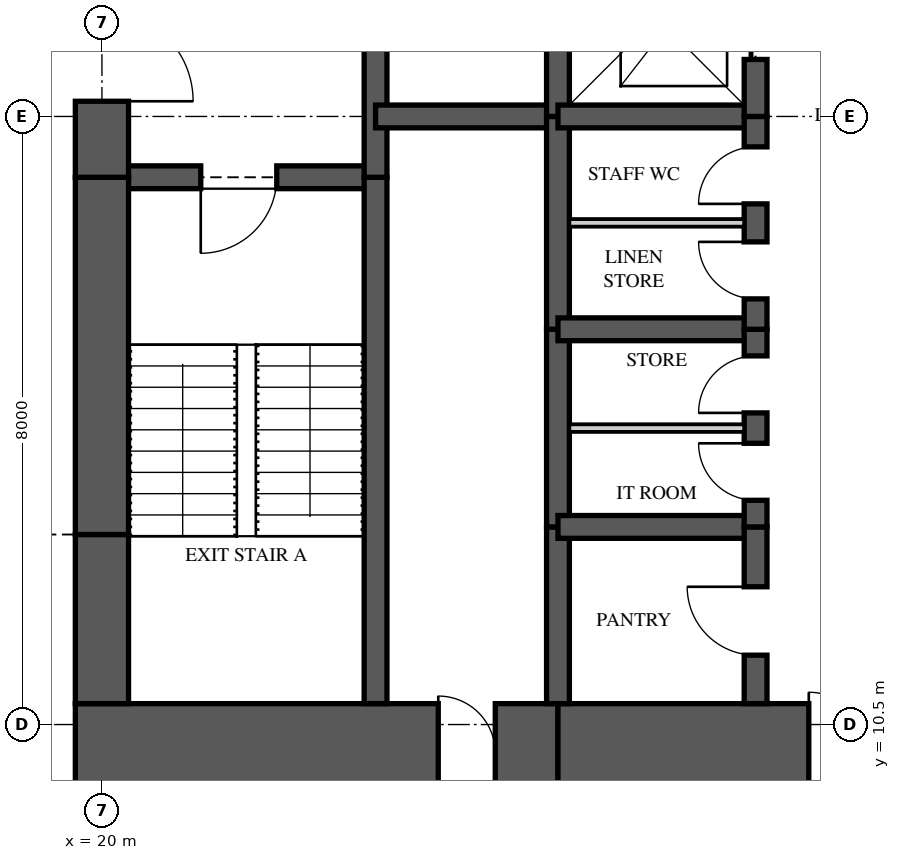
"""IFC4 building model, lengths in metres.
Left out: names, types, materials, properties, quantities, classifications, styles, units other than length and angle.
Written with IfcOpenShell. Run it as: python <this file> out.ifc"""

import sys

from ifc_helpers import new_model, si_unit, direction, frame, frame_2d, origin, place, context, subcontext, project, spatial, rectangle, extrude, element, fill, save


model = new_model("IFC4")
c1 = context("Model", 3, precision=1e-05, world=origin(), true_north=direction((0.0, 1.0)))
c2 = subcontext(c1, "Body", "Model", "MODEL_VIEW")
j1 = project(units=[si_unit("LENGTHUNIT", "METRE"), si_unit("PLANEANGLEUNIT", "RADIAN")], contexts=[c1])
p1 = place(None, origin())
s1 = spatial("IfcSite", under=j1, at=p1, CompositionType="ELEMENT")
p2 = place(p1, origin())
s2 = spatial("IfcBuilding", under=s1, at=p2, CompositionType="ELEMENT")
p3 = place(p2, frame((0.0, 0.0, 154.35)))
s3 = spatial("IfcBuildingStorey", under=s2, at=p3, CompositionType="ELEMENT", Elevation=154.35)
p4 = place(p3, frame((19.65, 10.125, 0.0), z_axis=(0.0, 0.0, 1.0), x_axis=(1.0, 0.0, 0.0)))
e1 = element("IfcWall", 1, at=p4, inside=s3, PredefinedType="SHEAR", context=c2, shape_type="SweptSolid", body=[
    extrude(rectangle(XDim=6.35, YDim=1.3, at=frame_2d((3.175, 0.0))), origin(), (0.0, 0.0, 1.0), 3.35),
])
p5 = place(p4, frame((4.775, 0.0, 0.0)))
e2 = element("IfcOpeningElement", 2, at=p5, cuts=e1, PredefinedType="OPENING", context=c2, shape_type="SweptSolid", body=[
    extrude(rectangle(XDim=0.75, YDim=2.1, at=frame_2d((0.375, 1.05))), frame((0.0, 0.66, 0.0), z_axis=(0.0, -1.0, 0.0), x_axis=(1.0, 0.0, 0.0)), (0.0, 0.0, 1.0), 1.32),
])
p6 = place(p3, frame((26.0, 10.125, 0.0), z_axis=(0.0, 0.0, 1.0), x_axis=(1.0, 0.0, 0.0)))
e3 = element("IfcWall", 3, at=p6, inside=s3, PredefinedType="SHEAR", context=c2, shape_type="SweptSolid", body=[
    extrude(rectangle(XDim=5.6, YDim=1.3, at=frame_2d((2.8, 0.0))), origin(), (0.0, 0.0, 1.0), 3.35),
])
p7 = place(p6, frame((3.3, 0.0, 0.0)))
e4 = element("IfcOpeningElement", 4, at=p7, cuts=e3, PredefinedType="OPENING", context=c2, shape_type="SweptSolid", body=[
    extrude(rectangle(XDim=1.6, YDim=2.1, at=frame_2d((0.8, 1.05))), frame((0.0, 0.66, 0.0), z_axis=(0.0, -1.0, 0.0), x_axis=(1.0, 0.0, 0.0)), (0.0, 0.0, 1.0), 1.32),
])
p8 = place(p3, frame((20.0, 23.3, 0.0), z_axis=(0.0, 0.0, 1.0), x_axis=(0.0, -1.0, 0.0)))
e5 = element("IfcWall", 5, at=p8, inside=s3, PredefinedType="SHEAR", context=c2, shape_type="SweptSolid", body=[
    extrude(rectangle(XDim=5.6, YDim=0.7, at=frame_2d((2.8, 0.0))), origin(), (0.0, 0.0, 1.0), 3.35),
])
p9 = place(p8, frame((3.4, 0.0, 0.0)))
e6 = element("IfcOpeningElement", 6, at=p9, cuts=e5, PredefinedType="OPENING", context=c2, shape_type="SweptSolid", body=[
    extrude(rectangle(XDim=1.2, YDim=2.2, at=frame_2d((0.6, 1.1))), frame((0.0, 0.36, 0.0), z_axis=(0.0, -1.0, 0.0), x_axis=(1.0, 0.0, 0.0)), (0.0, 0.0, 1.0), 0.72),
])
p10 = place(p3, frame((20.0, 17.7, 0.0), z_axis=(0.0, 0.0, 1.0), x_axis=(0.0, -1.0, 0.0)))
e7 = element("IfcWall", 7, at=p10, inside=s3, PredefinedType="SHEAR", context=c2, shape_type="SweptSolid", body=[
    extrude(rectangle(XDim=4.7, YDim=0.7, at=frame_2d((2.35, 0.0))), origin(), (0.0, 0.0, 1.0), 3.35),
])
p11 = place(p3, frame((20.0, 13.0, 0.0), z_axis=(0.0, 0.0, 1.0), x_axis=(0.0, -1.0, 0.0)))
e8 = element("IfcWall", 8, at=p11, inside=s3, PredefinedType="SHEAR", context=c2, shape_type="SweptSolid", body=[
    extrude(rectangle(XDim=2.225, YDim=0.7, at=frame_2d((1.113, 0.0))), origin(), (0.0, 0.0, 1.0), 3.35),
])
p12 = place(p3, frame((23.6, 10.775, 0.0), z_axis=(0.0, 0.0, 1.0), x_axis=(0.0, 1.0, 0.0)))
e9 = element("IfcWall", 9, at=p12, inside=s3, PredefinedType="SHEAR", context=c2, shape_type="SweptSolid", body=[
    extrude(rectangle(XDim=6.925, YDim=0.3, at=frame_2d((3.462, 0.0))), origin(), (0.0, 0.0, 1.0), 3.35),
])
p13 = place(p3, frame((23.6, 17.7, 0.0), z_axis=(0.0, 0.0, 1.0), x_axis=(0.0, 1.0, 0.0)))
e10 = element("IfcWall", 10, at=p13, inside=s3, PredefinedType="SHEAR", context=c2, shape_type="SweptSolid", body=[
    extrude(rectangle(XDim=5.6, YDim=0.3, at=frame_2d((2.8, 0.0))), origin(), (0.0, 0.0, 1.0), 3.35),
])
p14 = place(p3, frame((26.0, 10.775, 0.0), z_axis=(0.0, 0.0, 1.0), x_axis=(0.0, 1.0, 0.0)))
e11 = element("IfcWall", 11, at=p14, inside=s3, PredefinedType="SHEAR", context=c2, shape_type="SweptSolid", body=[
    extrude(rectangle(XDim=2.325, YDim=0.3, at=frame_2d((1.163, 0.0))), origin(), (0.0, 0.0, 1.0), 3.35),
])
p15 = place(p3, frame((26.0, 13.1, 0.0), z_axis=(0.0, 0.0, 1.0), x_axis=(0.0, 1.0, 0.0)))
e12 = element("IfcWall", 12, at=p15, inside=s3, PredefinedType="SHEAR", context=c2, shape_type="SweptSolid", body=[
    extrude(rectangle(XDim=2.6, YDim=0.3, at=frame_2d((1.3, 0.0))), origin(), (0.0, 0.0, 1.0), 3.35),
])
p16 = place(p3, frame((26.0, 15.7, 0.0), z_axis=(0.0, 0.0, 1.0), x_axis=(0.0, 1.0, 0.0)))
e13 = element("IfcWall", 13, at=p16, inside=s3, PredefinedType="SHEAR", context=c2, shape_type="SweptSolid", body=[
    extrude(rectangle(XDim=2.8, YDim=0.3, at=frame_2d((1.4, 0.0))), origin(), (0.0, 0.0, 1.0), 3.35),
])
p17 = place(p3, frame((26.0, 18.5, 0.0), z_axis=(0.0, 0.0, 1.0), x_axis=(0.0, 1.0, 0.0)))
e14 = element("IfcWall", 14, at=p17, inside=s3, PredefinedType="SHEAR", context=c2, shape_type="SweptSolid", body=[
    extrude(rectangle(XDim=2.6, YDim=0.3, at=frame_2d((1.3, 0.0))), origin(), (0.0, 0.0, 1.0), 3.35),
])
p18 = place(p3, frame((28.6, 10.775, 0.0), z_axis=(0.0, 0.0, 1.0), x_axis=(0.0, 1.0, 0.0)))
e15 = element("IfcWall", 15, at=p18, inside=s3, PredefinedType="SHEAR", context=c2, shape_type="SweptSolid", body=[
    extrude(rectangle(XDim=2.325, YDim=0.3, at=frame_2d((1.163, 0.0))), origin(), (0.0, 0.0, 1.0), 3.35),
])
p19 = place(p18, frame((0.637, 0.0, 0.0)))
e16 = element("IfcOpeningElement", 16, at=p19, cuts=e15, PredefinedType="OPENING", context=c2, shape_type="SweptSolid", body=[
    extrude(rectangle(XDim=0.9, YDim=2.1, at=frame_2d((0.45, 1.05))), frame((0.0, 0.16, 0.0), z_axis=(0.0, -1.0, 0.0), x_axis=(1.0, 0.0, 0.0)), (0.0, 0.0, 1.0), 0.32),
])
p20 = place(p3, frame((28.6, 13.1, 0.0), z_axis=(0.0, 0.0, 1.0), x_axis=(0.0, 1.0, 0.0)))
e17 = element("IfcWall", 17, at=p20, inside=s3, PredefinedType="SHEAR", context=c2, shape_type="SweptSolid", body=[
    extrude(rectangle(XDim=2.6, YDim=0.3, at=frame_2d((1.3, 0.0))), origin(), (0.0, 0.0, 1.0), 3.35),
])
p21 = place(p20, frame((0.35, 0.0, 0.0)))
e18 = element("IfcOpeningElement", 18, at=p21, cuts=e17, PredefinedType="OPENING", context=c2, shape_type="SweptSolid", body=[
    extrude(rectangle(XDim=0.75, YDim=2.1, at=frame_2d((0.375, 1.05))), frame((0.0, 0.16, 0.0), z_axis=(0.0, -1.0, 0.0), x_axis=(1.0, 0.0, 0.0)), (0.0, 0.0, 1.0), 0.32),
])
p22 = place(p20, frame((1.5, 0.0, 0.0)))
e19 = element("IfcOpeningElement", 19, at=p22, cuts=e17, PredefinedType="OPENING", context=c2, shape_type="SweptSolid", body=[
    extrude(rectangle(XDim=0.75, YDim=2.1, at=frame_2d((0.375, 1.05))), frame((0.0, 0.16, 0.0), z_axis=(0.0, -1.0, 0.0), x_axis=(1.0, 0.0, 0.0)), (0.0, 0.0, 1.0), 0.32),
])
p23 = place(p3, frame((28.6, 15.7, 0.0), z_axis=(0.0, 0.0, 1.0), x_axis=(0.0, 1.0, 0.0)))
e20 = element("IfcWall", 20, at=p23, inside=s3, PredefinedType="SHEAR", context=c2, shape_type="SweptSolid", body=[
    extrude(rectangle(XDim=2.8, YDim=0.3, at=frame_2d((1.4, 0.0))), origin(), (0.0, 0.0, 1.0), 3.35),
])
p24 = place(p23, frame((0.4, 0.0, 0.0)))
e21 = element("IfcOpeningElement", 21, at=p24, cuts=e20, PredefinedType="OPENING", context=c2, shape_type="SweptSolid", body=[
    extrude(rectangle(XDim=0.75, YDim=2.1, at=frame_2d((0.375, 1.05))), frame((0.0, 0.16, 0.0), z_axis=(0.0, -1.0, 0.0), x_axis=(1.0, 0.0, 0.0)), (0.0, 0.0, 1.0), 0.32),
])
p25 = place(p23, frame((1.65, 0.0, 0.0)))
e22 = element("IfcOpeningElement", 22, at=p25, cuts=e20, PredefinedType="OPENING", context=c2, shape_type="SweptSolid", body=[
    extrude(rectangle(XDim=0.75, YDim=2.1, at=frame_2d((0.375, 1.05))), frame((0.0, 0.16, 0.0), z_axis=(0.0, -1.0, 0.0), x_axis=(1.0, 0.0, 0.0)), (0.0, 0.0, 1.0), 0.32),
])
p26 = place(p3, frame((28.6, 18.5, 0.0), z_axis=(0.0, 0.0, 1.0), x_axis=(0.0, 1.0, 0.0)))
e23 = element("IfcWall", 23, at=p26, inside=s3, PredefinedType="SHEAR", context=c2, shape_type="SweptSolid", body=[
    extrude(rectangle(XDim=2.6, YDim=0.3, at=frame_2d((1.3, 0.0))), origin(), (0.0, 0.0, 1.0), 3.35),
])
p27 = place(p26, frame((0.75, 0.0, 0.0)))
e24 = element("IfcOpeningElement", 24, at=p27, cuts=e23, PredefinedType="OPENING", context=c2, shape_type="SweptSolid", body=[
    extrude(rectangle(XDim=1.1, YDim=2.1, at=frame_2d((0.55, 1.05))), frame((0.0, 0.16, 0.0), z_axis=(0.0, -1.0, 0.0), x_axis=(1.0, 0.0, 0.0)), (0.0, 0.0, 1.0), 0.32),
])
p28 = place(p3, frame((20.0, 17.7, 0.0), z_axis=(0.0, 0.0, 1.0), x_axis=(1.0, 0.0, 0.0)))
e25 = element("IfcWall", 25, at=p28, inside=s3, PredefinedType="SHEAR", context=c2, shape_type="SweptSolid", body=[
    extrude(rectangle(XDim=3.6, YDim=0.3, at=frame_2d((1.8, 0.0))), origin(), (0.0, 0.0, 1.0), 3.35),
])
p29 = place(p28, frame((1.3, 0.0, 0.0)))
e26 = element("IfcOpeningElement", 26, at=p29, cuts=e25, PredefinedType="OPENING", context=c2, shape_type="SweptSolid", body=[
    extrude(rectangle(XDim=1.0, YDim=2.1, at=frame_2d((0.5, 1.05))), frame((0.0, 0.16, 0.0), z_axis=(0.0, -1.0, 0.0), x_axis=(1.0, 0.0, 0.0)), (0.0, 0.0, 1.0), 0.32),
])
p30 = place(p3, frame((23.6, 18.5, 0.0), z_axis=(0.0, 0.0, 1.0), x_axis=(1.0, 0.0, 0.0)))
e27 = element("IfcWall", 27, at=p30, inside=s3, PredefinedType="SHEAR", context=c2, shape_type="SweptSolid", body=[
    extrude(rectangle(XDim=2.4, YDim=0.3, at=frame_2d((1.2, 0.0))), origin(), (0.0, 0.0, 1.0), 3.35),
])
for number, where, z_axis, x_axis in (
    (28, (26.0, 13.1, 0.0), (0.0, 0.0, 1.0), (1.0, 0.0, 0.0)),
    (29, (26.0, 15.7, 0.0), (0.0, 0.0, 1.0), (1.0, 0.0, 0.0)),
    (30, (26.0, 18.5, 0.0), (0.0, 0.0, 1.0), (1.0, 0.0, 0.0)),
):
    element("IfcWall", number, at=place(p3, frame(where, z_axis=z_axis, x_axis=x_axis)), inside=s3, PredefinedType="SHEAR", context=c2, shape_type="SweptSolid", body=[
        extrude(rectangle(XDim=2.6, YDim=0.3, at=frame_2d((1.3, 0.0))), origin(), (0.0, 0.0, 1.0), 3.35),
    ])
for number, where, z_axis, x_axis in (
    (31, (26.15, 14.4, 0.0), (0.0, 0.0, 1.0), (1.0, 0.0, 0.0)),
    (32, (26.15, 17.1, 0.0), (0.0, 0.0, 1.0), (1.0, 0.0, 0.0)),
):
    element("IfcWall", number, at=place(p3, frame(where, z_axis=z_axis, x_axis=x_axis)), inside=s3, PredefinedType="PARTITIONING", context=c2, shape_type="SweptSolid", body=[
        extrude(rectangle(XDim=2.3, YDim=0.1, at=frame_2d((1.15, 0.0))), origin(), (0.0, 0.0, 1.0), 3.11),
    ])
p31 = place(p29, frame((1.0, 0.0, 0.0), z_axis=(0.0, 0.0, 1.0), x_axis=(-1.0, 0.0, 0.0)))
e33 = element("IfcDoor", 33, at=p31, inside=s3, OperationType="SINGLE_SWING_RIGHT", PredefinedType="DOOR", context=c2, shape_type="SweptSolid", body=[
    extrude(rectangle(XDim=1.0, YDim=2.1, at=frame_2d((0.5, 1.05))), frame((0.0, 0.025, 0.0), z_axis=(0.0, -1.0, 0.0), x_axis=(1.0, 0.0, 0.0)), (0.0, 0.0, 1.0), 0.05),
])
fill(e26, e33)
p32 = place(p9, origin())
e34 = element("IfcDoor", 34, at=p32, inside=s3, OperationType="SINGLE_SWING_RIGHT", PredefinedType="DOOR", context=c2, shape_type="SweptSolid", body=[
    extrude(rectangle(XDim=1.2, YDim=2.2, at=frame_2d((0.6, 1.1))), frame((0.0, 0.025, 0.0), z_axis=(0.0, -1.0, 0.0), x_axis=(1.0, 0.0, 0.0)), (0.0, 0.0, 1.0), 0.05),
])
fill(e6, e34)
p33 = place(p27, origin())
e35 = element("IfcDoor", 35, at=p33, inside=s3, OperationType="SLIDING_TO_LEFT", PredefinedType="DOOR", context=c2, shape_type="SweptSolid", body=[
    extrude(rectangle(XDim=1.1, YDim=2.1, at=frame_2d((0.55, 1.05))), frame((0.0, 0.025, 0.0), z_axis=(0.0, -1.0, 0.0), x_axis=(1.0, 0.0, 0.0)), (0.0, 0.0, 1.0), 0.05),
])
fill(e24, e35)
p34 = place(p19, origin())
e36 = element("IfcDoor", 36, at=p34, inside=s3, OperationType="SINGLE_SWING_RIGHT", PredefinedType="DOOR", context=c2, shape_type="SweptSolid", body=[
    extrude(rectangle(XDim=0.9, YDim=2.1, at=frame_2d((0.45, 1.05))), frame((0.0, 0.025, 0.0), z_axis=(0.0, -1.0, 0.0), x_axis=(1.0, 0.0, 0.0)), (0.0, 0.0, 1.0), 0.05),
])
fill(e16, e36)
p35 = place(p21, origin())
e37 = element("IfcDoor", 37, at=p35, inside=s3, OperationType="SINGLE_SWING_RIGHT", PredefinedType="DOOR", context=c2, shape_type="SweptSolid", body=[
    extrude(rectangle(XDim=0.75, YDim=2.1, at=frame_2d((0.375, 1.05))), frame((0.0, 0.025, 0.0), z_axis=(0.0, -1.0, 0.0), x_axis=(1.0, 0.0, 0.0)), (0.0, 0.0, 1.0), 0.05),
])
fill(e18, e37)
p36 = place(p22, origin())
e38 = element("IfcDoor", 38, at=p36, inside=s3, OperationType="SINGLE_SWING_LEFT", PredefinedType="DOOR", context=c2, shape_type="SweptSolid", body=[
    extrude(rectangle(XDim=0.75, YDim=2.1, at=frame_2d((0.375, 1.05))), frame((0.0, 0.025, 0.0), z_axis=(0.0, -1.0, 0.0), x_axis=(1.0, 0.0, 0.0)), (0.0, 0.0, 1.0), 0.05),
])
fill(e19, e38)
p37 = place(p24, origin())
e39 = element("IfcDoor", 39, at=p37, inside=s3, OperationType="SINGLE_SWING_RIGHT", PredefinedType="DOOR", context=c2, shape_type="SweptSolid", body=[
    extrude(rectangle(XDim=0.75, YDim=2.1, at=frame_2d((0.375, 1.05))), frame((0.0, 0.025, 0.0), z_axis=(0.0, -1.0, 0.0), x_axis=(1.0, 0.0, 0.0)), (0.0, 0.0, 1.0), 0.05),
])
fill(e21, e39)
p38 = place(p25, origin())
e40 = element("IfcDoor", 40, at=p38, inside=s3, OperationType="SINGLE_SWING_LEFT", PredefinedType="DOOR", context=c2, shape_type="SweptSolid", body=[
    extrude(rectangle(XDim=0.75, YDim=2.1, at=frame_2d((0.375, 1.05))), frame((0.0, 0.025, 0.0), z_axis=(0.0, -1.0, 0.0), x_axis=(1.0, 0.0, 0.0)), (0.0, 0.0, 1.0), 0.05),
])
fill(e22, e40)
p39 = place(p7, origin())
e41 = element("IfcDoor", 41, at=p39, inside=s3, OperationType="DOUBLE_DOOR_SINGLE_SWING", PredefinedType="DOOR", context=c2, shape_type="SweptSolid", body=[
    extrude(rectangle(XDim=1.6, YDim=2.1, at=frame_2d((0.8, 1.05))), frame((0.0, 0.025, 0.0), z_axis=(0.0, -1.0, 0.0), x_axis=(1.0, 0.0, 0.0)), (0.0, 0.0, 1.0), 0.05),
])
fill(e4, e41)
p40 = place(p5, origin())
e42 = element("IfcDoor", 42, at=p40, inside=s3, OperationType="SINGLE_SWING_LEFT", PredefinedType="DOOR", context=c2, shape_type="SweptSolid", body=[
    extrude(rectangle(XDim=0.75, YDim=2.1, at=frame_2d((0.375, 1.05))), frame((0.0, 0.025, 0.0), z_axis=(0.0, -1.0, 0.0), x_axis=(1.0, 0.0, 0.0)), (0.0, 0.0, 1.0), 0.05),
])
fill(e2, e42)
save(model, sys.argv[1])
